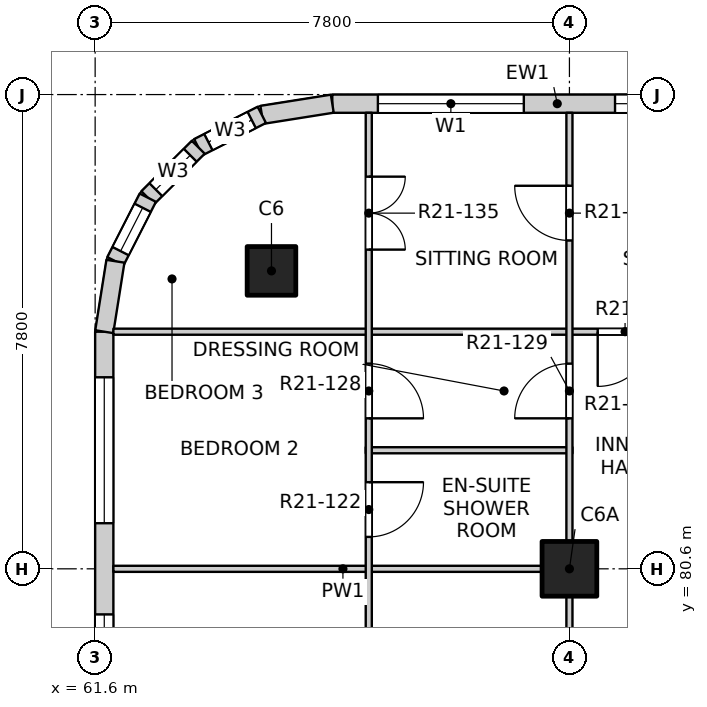
"""IFC4 building model, lengths in metres.
Left out: names, types, materials, properties, quantities, classifications, styles, units other than length and angle.
Written with IfcOpenShell. Run it as: python <this file> out.ifc"""

import sys

from ifc_helpers import new_model, si_unit, direction, frame, frame_2d, origin, origin_2d, place, context, subcontext, project, spatial, rectangle, extrude, element, fill, save


model = new_model("IFC4")
c1 = context("Model", 3, precision=1e-05, world=origin(), true_north=direction((0.0, 1.0)))
c2 = subcontext(c1, "Body", "Model", "MODEL_VIEW")
j1 = project(units=[si_unit("LENGTHUNIT", "METRE"), si_unit("PLANEANGLEUNIT", "RADIAN")], contexts=[c1])
p1 = place(None, origin())
s1 = spatial("IfcSite", under=j1, at=p1, CompositionType="ELEMENT")
p2 = place(p1, origin())
s2 = spatial("IfcBuilding", under=s1, at=p2, CompositionType="ELEMENT")
p3 = place(p2, frame((0.0, 0.0, 221.1)))
s3 = spatial("IfcBuildingStorey", under=s2, at=p3, CompositionType="ELEMENT", Elevation=221.1)
p4 = place(p3, frame((64.5, 85.5, -0.25), z_axis=(0.0, 0.0, 1.0), x_axis=(1.0, 0.0, 0.0)))
e1 = element("IfcColumn", 1, at=p4, inside=s3, PredefinedType="COLUMN", context=c2, shape_type="SweptSolid", body=[
    extrude(rectangle(XDim=0.8, YDim=0.8, at=origin_2d()), origin(), (0.0, 0.0, 1.0), 3.4),
])
p5 = place(p3, frame((69.4, 80.6, -0.25), z_axis=(0.0, 0.0, 1.0), x_axis=(1.0, 0.0, 0.0)))
e2 = element("IfcColumn", 2, at=p5, inside=s3, PredefinedType="COLUMN", context=c2, shape_type="SweptSolid", body=[
    extrude(rectangle(XDim=0.9, YDim=0.9, at=origin_2d()), origin(), (0.0, 0.0, 1.0), 3.4),
])
p6 = place(p3, frame((65.5, 88.25, 0.0), z_axis=(0.0, 0.0, 1.0), x_axis=(1.0, 0.0, 0.0)))
e3 = element("IfcWall", 3, at=p6, inside=s3, PredefinedType="SOLIDWALL", context=c2, shape_type="SweptSolid", body=[
    extrude(rectangle(XDim=7.4, YDim=0.3, at=frame_2d((3.7, 0.0))), origin(), (0.0, 0.0, 1.0), 2.7),
])
p7 = place(p6, frame((0.75, 0.0, 0.9)))
e4 = element("IfcOpeningElement", 4, at=p7, cuts=e3, PredefinedType="OPENING", context=c2, shape_type="SweptSolid", body=[
    extrude(rectangle(XDim=2.4, YDim=1.8, at=frame_2d((1.2, 0.9))), frame((0.0, 0.16, 0.0), z_axis=(0.0, -1.0, 0.0), x_axis=(1.0, 0.0, 0.0)), (0.0, 0.0, 1.0), 0.32),
])
p8 = place(p6, frame((4.65, 0.0, 0.9)))
e5 = element("IfcOpeningElement", 5, at=p8, cuts=e3, PredefinedType="OPENING", context=c2, shape_type="SweptSolid", body=[
    extrude(rectangle(XDim=2.4, YDim=1.8, at=frame_2d((1.2, 0.9))), frame((0.0, 0.16, 0.0), z_axis=(0.0, -1.0, 0.0), x_axis=(1.0, 0.0, 0.0)), (0.0, 0.0, 1.0), 0.32),
])
p9 = place(p3, frame((61.75, 77.1, 0.0), z_axis=(0.0, 0.0, 1.0), x_axis=(0.0, 1.0, 0.0)))
e6 = element("IfcWall", 6, at=p9, inside=s3, PredefinedType="SOLIDWALL", context=c2, shape_type="SweptSolid", body=[
    extrude(rectangle(XDim=7.4, YDim=0.3, at=frame_2d((3.7, 0.0))), origin(), (0.0, 0.0, 1.0), 2.7),
])
p10 = place(p9, frame((0.35, 0.0, 0.9)))
e7 = element("IfcOpeningElement", 7, at=p10, cuts=e6, PredefinedType="OPENING", context=c2, shape_type="SweptSolid", body=[
    extrude(rectangle(XDim=2.4, YDim=1.8, at=frame_2d((1.2, 0.9))), frame((0.0, 0.16, 0.0), z_axis=(0.0, -1.0, 0.0), x_axis=(1.0, 0.0, 0.0)), (0.0, 0.0, 1.0), 0.32),
])
p11 = place(p9, frame((4.25, 0.0, 0.9)))
e8 = element("IfcOpeningElement", 8, at=p11, cuts=e6, PredefinedType="OPENING", context=c2, shape_type="SweptSolid", body=[
    extrude(rectangle(XDim=2.4, YDim=1.8, at=frame_2d((1.2, 0.9))), frame((0.0, 0.16, 0.0), z_axis=(0.0, -1.0, 0.0), x_axis=(1.0, 0.0, 0.0)), (0.0, 0.0, 1.0), 0.32),
])
p12 = place(p3, frame((65.5, 88.25, 0.0), z_axis=(0.0, 0.0, 1.0), x_axis=(-0.987678452879, -0.156496880861, 0.0)))
e9 = element("IfcWall", 9, at=p12, inside=s3, PredefinedType="SOLIDWALL", context=c2, shape_type="SweptSolid", body=[
    extrude(rectangle(XDim=1.173, YDim=0.3, at=frame_2d((0.586, 0.0))), origin(), (0.0, 0.0, 1.0), 2.7),
])
p13 = place(p3, frame((64.341, 88.066, 0.0), z_axis=(0.0, 0.0, 1.0), x_axis=(-0.890988677504, -0.454025524128, 0.0)))
e10 = element("IfcWall", 10, at=p13, inside=s3, PredefinedType="SOLIDWALL", context=c2, shape_type="SweptSolid", body=[
    extrude(rectangle(XDim=1.173, YDim=0.3, at=frame_2d((0.587, 0.0))), origin(), (0.0, 0.0, 1.0), 2.7),
])
p14 = place(p13, frame((0.187, 0.0, 0.9)))
e11 = element("IfcOpeningElement", 11, at=p14, cuts=e10, PredefinedType="OPENING", context=c2, shape_type="SweptSolid", body=[
    extrude(rectangle(XDim=0.8, YDim=1.2, at=frame_2d((0.4, 0.6))), frame((0.0, 0.16, 0.0), z_axis=(0.0, -1.0, 0.0), x_axis=(1.0, 0.0, 0.0)), (0.0, 0.0, 1.0), 0.32),
])
p15 = place(p3, frame((63.296, 87.534, 0.0), z_axis=(0.0, 0.0, 1.0), x_axis=(-0.707106781187, -0.707106781187, 0.0)))
e12 = element("IfcWall", 12, at=p15, inside=s3, PredefinedType="SOLIDWALL", context=c2, shape_type="SweptSolid", body=[
    extrude(rectangle(XDim=1.173, YDim=0.3, at=frame_2d((0.586, 0.0))), origin(), (0.0, 0.0, 1.0), 2.7),
])
p16 = place(p15, frame((0.187, 0.0, 0.9)))
e13 = element("IfcOpeningElement", 13, at=p16, cuts=e12, PredefinedType="OPENING", context=c2, shape_type="SweptSolid", body=[
    extrude(rectangle(XDim=0.8, YDim=1.2, at=frame_2d((0.4, 0.6))), frame((0.0, 0.16, 0.0), z_axis=(0.0, -1.0, 0.0), x_axis=(1.0, 0.0, 0.0)), (0.0, 0.0, 1.0), 0.32),
])
p17 = place(p3, frame((62.466, 86.704, 0.0), z_axis=(0.0, 0.0, 1.0), x_axis=(-0.454025524128, -0.890988677504, 0.0)))
e14 = element("IfcWall", 14, at=p17, inside=s3, PredefinedType="SOLIDWALL", context=c2, shape_type="SweptSolid", body=[
    extrude(rectangle(XDim=1.173, YDim=0.3, at=frame_2d((0.587, 0.0))), origin(), (0.0, 0.0, 1.0), 2.7),
])
p18 = place(p17, frame((0.187, 0.0, 0.9)))
e15 = element("IfcOpeningElement", 15, at=p18, cuts=e14, PredefinedType="OPENING", context=c2, shape_type="SweptSolid", body=[
    extrude(rectangle(XDim=0.8, YDim=1.2, at=frame_2d((0.4, 0.6))), frame((0.0, 0.16, 0.0), z_axis=(0.0, -1.0, 0.0), x_axis=(1.0, 0.0, 0.0)), (0.0, 0.0, 1.0), 0.32),
])
p19 = place(p3, frame((61.934, 85.659, 0.0), z_axis=(0.0, 0.0, 1.0), x_axis=(-0.156496880861, -0.987678452879, 0.0)))
e16 = element("IfcWall", 16, at=p19, inside=s3, PredefinedType="SOLIDWALL", context=c2, shape_type="SweptSolid", body=[
    extrude(rectangle(XDim=1.173, YDim=0.3, at=frame_2d((0.586, 0.0))), origin(), (0.0, 0.0, 1.0), 2.7),
])
p20 = place(p3, frame((61.9, 80.6, 0.0), z_axis=(0.0, 0.0, 1.0), x_axis=(1.0, 0.0, 0.0)))
e17 = element("IfcWall", 17, at=p20, inside=s3, PredefinedType="PARTITIONING", context=c2, shape_type="SweptSolid", body=[
    extrude(rectangle(XDim=7.55, YDim=0.1, at=frame_2d((3.775, 0.0))), origin(), (0.0, 0.0, 1.0), 3.15),
])
p21 = place(p3, frame((66.05, 82.55, 0.0), z_axis=(0.0, 0.0, 1.0), x_axis=(1.0, 0.0, 0.0)))
e18 = element("IfcWall", 18, at=p21, inside=s3, PredefinedType="PARTITIONING", context=c2, shape_type="SweptSolid", body=[
    extrude(rectangle(XDim=3.4, YDim=0.1, at=frame_2d((1.7, 0.0))), origin(), (0.0, 0.0, 1.0), 3.15),
])
p22 = place(p3, frame((61.9, 84.5, 0.0), z_axis=(0.0, 0.0, 1.0), x_axis=(1.0, 0.0, 0.0)))
e19 = element("IfcWall", 19, at=p22, inside=s3, PredefinedType="PARTITIONING", context=c2, shape_type="SweptSolid", body=[
    extrude(rectangle(XDim=11.5, YDim=0.1, at=frame_2d((5.75, 0.0))), origin(), (0.0, 0.0, 1.0), 3.15),
])
p23 = place(p22, frame((7.965, 0.0, 0.0)))
e20 = element("IfcOpeningElement", 20, at=p23, cuts=e19, PredefinedType="OPENING", context=c2, shape_type="SweptSolid", body=[
    extrude(rectangle(XDim=0.9, YDim=2.1, at=frame_2d((0.45, 1.05))), frame((0.0, 0.06, 0.0), z_axis=(0.0, -1.0, 0.0), x_axis=(1.0, 0.0, 0.0)), (0.0, 0.0, 1.0), 0.12),
])
p24 = place(p3, frame((66.1, 61.2, 0.0), z_axis=(0.0, 0.0, 1.0), x_axis=(0.0, 1.0, 0.0)))
e21 = element("IfcWall", 21, at=p24, inside=s3, PredefinedType="PARTITIONING", context=c2, shape_type="SweptSolid", body=[
    extrude(rectangle(XDim=26.9, YDim=0.1, at=frame_2d((13.45, 0.0))), origin(), (0.0, 0.0, 1.0), 3.15),
])
p25 = place(p24, frame((1.25, 0.0, 0.0)))
e22 = element("IfcOpeningElement", 22, at=p25, cuts=e21, PredefinedType="OPENING", context=c2, shape_type="SweptSolid", body=[
    extrude(rectangle(XDim=1.2, YDim=2.1, at=frame_2d((0.6, 1.05))), frame((0.0, 0.06, 0.0), z_axis=(0.0, -1.0, 0.0), x_axis=(1.0, 0.0, 0.0)), (0.0, 0.0, 1.0), 0.12),
])
p26 = place(p24, frame((5.15, 0.0, 0.0)))
e23 = element("IfcOpeningElement", 23, at=p26, cuts=e21, PredefinedType="OPENING", context=c2, shape_type="SweptSolid", body=[
    extrude(rectangle(XDim=1.2, YDim=2.1, at=frame_2d((0.6, 1.05))), frame((0.0, 0.06, 0.0), z_axis=(0.0, -1.0, 0.0), x_axis=(1.0, 0.0, 0.0)), (0.0, 0.0, 1.0), 0.12),
])
p27 = place(p24, frame((8.225, 0.0, 0.0)))
e24 = element("IfcOpeningElement", 24, at=p27, cuts=e21, PredefinedType="OPENING", context=c2, shape_type="SweptSolid", body=[
    extrude(rectangle(XDim=0.9, YDim=2.1, at=frame_2d((0.45, 1.05))), frame((0.0, 0.06, 0.0), z_axis=(0.0, -1.0, 0.0), x_axis=(1.0, 0.0, 0.0)), (0.0, 0.0, 1.0), 0.12),
])
p28 = place(p24, frame((10.175, 0.0, 0.0)))
e25 = element("IfcOpeningElement", 25, at=p28, cuts=e21, PredefinedType="OPENING", context=c2, shape_type="SweptSolid", body=[
    extrude(rectangle(XDim=0.9, YDim=2.1, at=frame_2d((0.45, 1.05))), frame((0.0, 0.06, 0.0), z_axis=(0.0, -1.0, 0.0), x_axis=(1.0, 0.0, 0.0)), (0.0, 0.0, 1.0), 0.12),
])
p29 = place(p24, frame((12.125, 0.0, 0.0)))
e26 = element("IfcOpeningElement", 26, at=p29, cuts=e21, PredefinedType="OPENING", context=c2, shape_type="SweptSolid", body=[
    extrude(rectangle(XDim=0.9, YDim=2.1, at=frame_2d((0.45, 1.05))), frame((0.0, 0.06, 0.0), z_axis=(0.0, -1.0, 0.0), x_axis=(1.0, 0.0, 0.0)), (0.0, 0.0, 1.0), 0.12),
])
p30 = place(p24, frame((14.075, 0.0, 0.0)))
e27 = element("IfcOpeningElement", 27, at=p30, cuts=e21, PredefinedType="OPENING", context=c2, shape_type="SweptSolid", body=[
    extrude(rectangle(XDim=0.9, YDim=2.1, at=frame_2d((0.45, 1.05))), frame((0.0, 0.06, 0.0), z_axis=(0.0, -1.0, 0.0), x_axis=(1.0, 0.0, 0.0)), (0.0, 0.0, 1.0), 0.12),
])
p31 = place(p24, frame((16.85, 0.0, 0.0)))
e28 = element("IfcOpeningElement", 28, at=p31, cuts=e21, PredefinedType="OPENING", context=c2, shape_type="SweptSolid", body=[
    extrude(rectangle(XDim=1.2, YDim=2.1, at=frame_2d((0.6, 1.05))), frame((0.0, 0.06, 0.0), z_axis=(0.0, -1.0, 0.0), x_axis=(1.0, 0.0, 0.0)), (0.0, 0.0, 1.0), 0.12),
])
p32 = place(p24, frame((19.925, 0.0, 0.0)))
e29 = element("IfcOpeningElement", 29, at=p32, cuts=e21, PredefinedType="OPENING", context=c2, shape_type="SweptSolid", body=[
    extrude(rectangle(XDim=0.9, YDim=2.1, at=frame_2d((0.45, 1.05))), frame((0.0, 0.06, 0.0), z_axis=(0.0, -1.0, 0.0), x_axis=(1.0, 0.0, 0.0)), (0.0, 0.0, 1.0), 0.12),
])
p33 = place(p24, frame((21.875, 0.0, 0.0)))
e30 = element("IfcOpeningElement", 30, at=p33, cuts=e21, PredefinedType="OPENING", context=c2, shape_type="SweptSolid", body=[
    extrude(rectangle(XDim=0.9, YDim=2.1, at=frame_2d((0.45, 1.05))), frame((0.0, 0.06, 0.0), z_axis=(0.0, -1.0, 0.0), x_axis=(1.0, 0.0, 0.0)), (0.0, 0.0, 1.0), 0.12),
])
p34 = place(p24, frame((24.65, 0.0, 0.0)))
e31 = element("IfcOpeningElement", 31, at=p34, cuts=e21, PredefinedType="OPENING", context=c2, shape_type="SweptSolid", body=[
    extrude(rectangle(XDim=1.2, YDim=2.1, at=frame_2d((0.6, 1.05))), frame((0.0, 0.06, 0.0), z_axis=(0.0, -1.0, 0.0), x_axis=(1.0, 0.0, 0.0)), (0.0, 0.0, 1.0), 0.12),
])
p35 = place(p3, frame((69.4, 41.9, 0.0), z_axis=(0.0, 0.0, 1.0), x_axis=(0.0, 1.0, 0.0)))
e32 = element("IfcWall", 32, at=p35, inside=s3, PredefinedType="PARTITIONING", context=c2, shape_type="SweptSolid", body=[
    extrude(rectangle(XDim=46.2, YDim=0.1, at=frame_2d((23.1, 0.0))), origin(), (0.0, 0.0, 1.0), 3.15),
])
p36 = place(p35, frame((1.2, 0.0, 0.0)))
e33 = element("IfcOpeningElement", 33, at=p36, cuts=e32, PredefinedType="OPENING", context=c2, shape_type="SweptSolid", body=[
    extrude(rectangle(XDim=0.9, YDim=2.1, at=frame_2d((0.45, 1.05))), frame((0.0, 0.06, 0.0), z_axis=(0.0, -1.0, 0.0), x_axis=(1.0, 0.0, 0.0)), (0.0, 0.0, 1.0), 0.12),
])
p37 = place(p35, frame((6.025, 0.0, 0.0)))
e34 = element("IfcOpeningElement", 34, at=p37, cuts=e32, PredefinedType="OPENING", context=c2, shape_type="SweptSolid", body=[
    extrude(rectangle(XDim=0.9, YDim=2.1, at=frame_2d((0.45, 1.05))), frame((0.0, 0.06, 0.0), z_axis=(0.0, -1.0, 0.0), x_axis=(1.0, 0.0, 0.0)), (0.0, 0.0, 1.0), 0.12),
])
p38 = place(p35, frame((9.0, 0.0, 0.0)))
e35 = element("IfcOpeningElement", 35, at=p38, cuts=e32, PredefinedType="OPENING", context=c2, shape_type="SweptSolid", body=[
    extrude(rectangle(XDim=0.9, YDim=2.1, at=frame_2d((0.45, 1.05))), frame((0.0, 0.06, 0.0), z_axis=(0.0, -1.0, 0.0), x_axis=(1.0, 0.0, 0.0)), (0.0, 0.0, 1.0), 0.12),
])
p39 = place(p35, frame((12.9, 0.0, 0.0)))
e36 = element("IfcOpeningElement", 36, at=p39, cuts=e32, PredefinedType="OPENING", context=c2, shape_type="SweptSolid", body=[
    extrude(rectangle(XDim=0.9, YDim=2.1, at=frame_2d((0.45, 1.05))), frame((0.0, 0.06, 0.0), z_axis=(0.0, -1.0, 0.0), x_axis=(1.0, 0.0, 0.0)), (0.0, 0.0, 1.0), 0.12),
])
p40 = place(p35, frame((17.775, 0.0, 0.0)))
e37 = element("IfcOpeningElement", 37, at=p40, cuts=e32, PredefinedType="OPENING", context=c2, shape_type="SweptSolid", body=[
    extrude(rectangle(XDim=0.9, YDim=2.1, at=frame_2d((0.45, 1.05))), frame((0.0, 0.06, 0.0), z_axis=(0.0, -1.0, 0.0), x_axis=(1.0, 0.0, 0.0)), (0.0, 0.0, 1.0), 0.12),
])
p41 = place(p35, frame((20.7, 0.0, 0.0)))
e38 = element("IfcOpeningElement", 38, at=p41, cuts=e32, PredefinedType="OPENING", context=c2, shape_type="SweptSolid", body=[
    extrude(rectangle(XDim=0.9, YDim=2.1, at=frame_2d((0.45, 1.05))), frame((0.0, 0.06, 0.0), z_axis=(0.0, -1.0, 0.0), x_axis=(1.0, 0.0, 0.0)), (0.0, 0.0, 1.0), 0.12),
])
p42 = place(p35, frame((24.6, 0.0, 0.0)))
e39 = element("IfcOpeningElement", 39, at=p42, cuts=e32, PredefinedType="OPENING", context=c2, shape_type="SweptSolid", body=[
    extrude(rectangle(XDim=0.9, YDim=2.1, at=frame_2d((0.45, 1.05))), frame((0.0, 0.06, 0.0), z_axis=(0.0, -1.0, 0.0), x_axis=(1.0, 0.0, 0.0)), (0.0, 0.0, 1.0), 0.12),
])
p43 = place(p35, frame((29.425, 0.0, 0.0)))
e40 = element("IfcOpeningElement", 40, at=p43, cuts=e32, PredefinedType="OPENING", context=c2, shape_type="SweptSolid", body=[
    extrude(rectangle(XDim=0.9, YDim=2.1, at=frame_2d((0.45, 1.05))), frame((0.0, 0.06, 0.0), z_axis=(0.0, -1.0, 0.0), x_axis=(1.0, 0.0, 0.0)), (0.0, 0.0, 1.0), 0.12),
])
p44 = place(p35, frame((33.375, 0.0, 0.0)))
e41 = element("IfcOpeningElement", 41, at=p44, cuts=e32, PredefinedType="OPENING", context=c2, shape_type="SweptSolid", body=[
    extrude(rectangle(XDim=0.9, YDim=2.1, at=frame_2d((0.45, 1.05))), frame((0.0, 0.06, 0.0), z_axis=(0.0, -1.0, 0.0), x_axis=(1.0, 0.0, 0.0)), (0.0, 0.0, 1.0), 0.12),
])
p45 = place(p35, frame((36.3, 0.0, 0.0)))
e42 = element("IfcOpeningElement", 42, at=p45, cuts=e32, PredefinedType="OPENING", context=c2, shape_type="SweptSolid", body=[
    extrude(rectangle(XDim=0.9, YDim=2.1, at=frame_2d((0.45, 1.05))), frame((0.0, 0.06, 0.0), z_axis=(0.0, -1.0, 0.0), x_axis=(1.0, 0.0, 0.0)), (0.0, 0.0, 1.0), 0.12),
])
p46 = place(p35, frame((41.175, 0.0, 0.0)))
e43 = element("IfcOpeningElement", 43, at=p46, cuts=e32, PredefinedType="OPENING", context=c2, shape_type="SweptSolid", body=[
    extrude(rectangle(XDim=0.9, YDim=2.1, at=frame_2d((0.45, 1.05))), frame((0.0, 0.06, 0.0), z_axis=(0.0, -1.0, 0.0), x_axis=(1.0, 0.0, 0.0)), (0.0, 0.0, 1.0), 0.12),
])
p47 = place(p35, frame((44.1, 0.0, 0.0)))
e44 = element("IfcOpeningElement", 44, at=p47, cuts=e32, PredefinedType="OPENING", context=c2, shape_type="SweptSolid", body=[
    extrude(rectangle(XDim=0.9, YDim=2.1, at=frame_2d((0.45, 1.05))), frame((0.0, 0.06, 0.0), z_axis=(0.0, -1.0, 0.0), x_axis=(1.0, 0.0, 0.0)), (0.0, 0.0, 1.0), 0.12),
])
p48 = place(p7, origin())
e45 = element("IfcWindow", 45, at=p48, inside=s3, PartitioningType="DOUBLE_PANEL_VERTICAL", PredefinedType="WINDOW", context=c2, shape_type="SweptSolid", body=[
    extrude(rectangle(XDim=2.4, YDim=1.8, at=frame_2d((1.2, 0.9))), frame((0.0, 0.03, 0.0), z_axis=(0.0, -1.0, 0.0), x_axis=(1.0, 0.0, 0.0)), (0.0, 0.0, 1.0), 0.06),
])
fill(e4, e45)
p49 = place(p8, origin())
e46 = element("IfcWindow", 46, at=p49, inside=s3, PartitioningType="DOUBLE_PANEL_VERTICAL", PredefinedType="WINDOW", context=c2, shape_type="SweptSolid", body=[
    extrude(rectangle(XDim=2.4, YDim=1.8, at=frame_2d((1.2, 0.9))), frame((0.0, 0.03, 0.0), z_axis=(0.0, -1.0, 0.0), x_axis=(1.0, 0.0, 0.0)), (0.0, 0.0, 1.0), 0.06),
])
fill(e5, e46)
p50 = place(p10, origin())
e47 = element("IfcWindow", 47, at=p50, inside=s3, PartitioningType="DOUBLE_PANEL_VERTICAL", PredefinedType="WINDOW", context=c2, shape_type="SweptSolid", body=[
    extrude(rectangle(XDim=2.4, YDim=1.8, at=frame_2d((1.2, 0.9))), frame((0.0, 0.03, 0.0), z_axis=(0.0, -1.0, 0.0), x_axis=(1.0, 0.0, 0.0)), (0.0, 0.0, 1.0), 0.06),
])
fill(e7, e47)
p51 = place(p11, origin())
e48 = element("IfcWindow", 48, at=p51, inside=s3, PartitioningType="DOUBLE_PANEL_VERTICAL", PredefinedType="WINDOW", context=c2, shape_type="SweptSolid", body=[
    extrude(rectangle(XDim=2.4, YDim=1.8, at=frame_2d((1.2, 0.9))), frame((0.0, 0.03, 0.0), z_axis=(0.0, -1.0, 0.0), x_axis=(1.0, 0.0, 0.0)), (0.0, 0.0, 1.0), 0.06),
])
fill(e8, e48)
p52 = place(p14, origin())
e49 = element("IfcWindow", 49, at=p52, inside=s3, PartitioningType="SINGLE_PANEL", PredefinedType="WINDOW", context=c2, shape_type="SweptSolid", body=[
    extrude(rectangle(XDim=0.8, YDim=1.2, at=frame_2d((0.4, 0.6))), frame((0.0, 0.03, 0.0), z_axis=(0.0, -1.0, 0.0), x_axis=(1.0, 0.0, 0.0)), (0.0, 0.0, 1.0), 0.06),
])
fill(e11, e49)
p53 = place(p16, origin())
e50 = element("IfcWindow", 50, at=p53, inside=s3, PartitioningType="SINGLE_PANEL", PredefinedType="WINDOW", context=c2, shape_type="SweptSolid", body=[
    extrude(rectangle(XDim=0.8, YDim=1.2, at=frame_2d((0.4, 0.6))), frame((0.0, 0.03, 0.0), z_axis=(0.0, -1.0, 0.0), x_axis=(1.0, 0.0, 0.0)), (0.0, 0.0, 1.0), 0.06),
])
fill(e13, e50)
p54 = place(p18, origin())
e51 = element("IfcWindow", 51, at=p54, inside=s3, PartitioningType="SINGLE_PANEL", PredefinedType="WINDOW", context=c2, shape_type="SweptSolid", body=[
    extrude(rectangle(XDim=0.8, YDim=1.2, at=frame_2d((0.4, 0.6))), frame((0.0, 0.03, 0.0), z_axis=(0.0, -1.0, 0.0), x_axis=(1.0, 0.0, 0.0)), (0.0, 0.0, 1.0), 0.06),
])
fill(e15, e51)
p55 = place(p32, origin())
e52 = element("IfcDoor", 52, at=p55, inside=s3, OperationType="SINGLE_SWING_LEFT", PredefinedType="DOOR", context=c2, shape_type="SweptSolid", body=[
    extrude(rectangle(XDim=0.9, YDim=2.1, at=frame_2d((0.45, 1.05))), frame((0.0, 0.025, 0.0), z_axis=(0.0, -1.0, 0.0), x_axis=(1.0, 0.0, 0.0)), (0.0, 0.0, 1.0), 0.05),
])
fill(e29, e52)
p56 = place(p33, origin())
e53 = element("IfcDoor", 53, at=p56, inside=s3, OperationType="SINGLE_SWING_RIGHT", PredefinedType="DOOR", context=c2, shape_type="SweptSolid", body=[
    extrude(rectangle(XDim=0.9, YDim=2.1, at=frame_2d((0.45, 1.05))), frame((0.0, 0.025, 0.0), z_axis=(0.0, -1.0, 0.0), x_axis=(1.0, 0.0, 0.0)), (0.0, 0.0, 1.0), 0.05),
])
fill(e30, e53)
p57 = place(p46, origin())
e54 = element("IfcDoor", 54, at=p57, inside=s3, OperationType="SINGLE_SWING_LEFT", PredefinedType="DOOR", context=c2, shape_type="SweptSolid", body=[
    extrude(rectangle(XDim=0.9, YDim=2.1, at=frame_2d((0.45, 1.05))), frame((0.0, 0.025, 0.0), z_axis=(0.0, -1.0, 0.0), x_axis=(1.0, 0.0, 0.0)), (0.0, 0.0, 1.0), 0.05),
])
fill(e43, e54)
p58 = place(p23, origin())
e55 = element("IfcDoor", 55, at=p58, inside=s3, OperationType="SINGLE_SWING_RIGHT", PredefinedType="DOOR", context=c2, shape_type="SweptSolid", body=[
    extrude(rectangle(XDim=0.9, YDim=2.1, at=frame_2d((0.45, 1.05))), frame((0.0, 0.025, 0.0), z_axis=(0.0, -1.0, 0.0), x_axis=(1.0, 0.0, 0.0)), (0.0, 0.0, 1.0), 0.05),
])
fill(e20, e55)
p59 = place(p34, origin())
e56 = element("IfcDoor", 56, at=p59, inside=s3, OperationType="DOUBLE_DOOR_SINGLE_SWING", PredefinedType="DOOR", context=c2, shape_type="SweptSolid", body=[
    extrude(rectangle(XDim=1.2, YDim=2.1, at=frame_2d((0.6, 1.05))), frame((0.0, 0.025, 0.0), z_axis=(0.0, -1.0, 0.0), x_axis=(1.0, 0.0, 0.0)), (0.0, 0.0, 1.0), 0.05),
])
fill(e31, e56)
p60 = place(p47, origin())
e57 = element("IfcDoor", 57, at=p60, inside=s3, OperationType="SINGLE_SWING_RIGHT", PredefinedType="DOOR", context=c2, shape_type="SweptSolid", body=[
    extrude(rectangle(XDim=0.9, YDim=2.1, at=frame_2d((0.45, 1.05))), frame((0.0, 0.025, 0.0), z_axis=(0.0, -1.0, 0.0), x_axis=(1.0, 0.0, 0.0)), (0.0, 0.0, 1.0), 0.05),
])
fill(e44, e57)
save(model, sys.argv[1])
